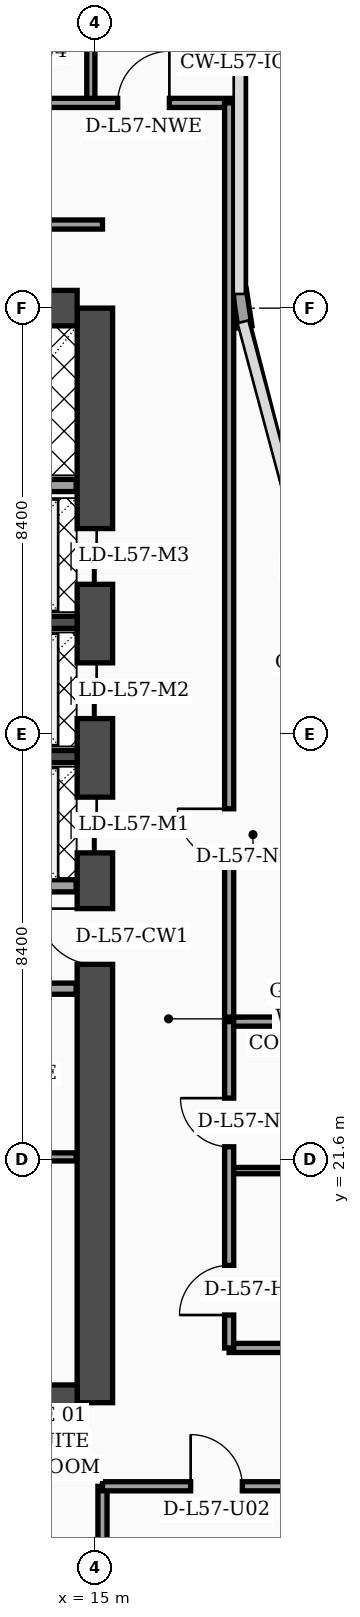
"""IFC4 building model, lengths in metres.
Left out: names, types, materials, properties, quantities, classifications, styles, units other than length and angle.
Written with IfcOpenShell. Run it as: python <this file> out.ifc"""

import sys

from ifc_helpers import new_model, si_unit, direction, frame, frame_2d, origin, place, context, subcontext, project, spatial, rectangle, extrude, element, fill, save


model = new_model("IFC4")
c1 = context("Model", 3, precision=1e-05, world=origin(), true_north=direction((0.0, 1.0)))
c2 = subcontext(c1, "Body", "Model", "MODEL_VIEW")
j1 = project(units=[si_unit("LENGTHUNIT", "METRE"), si_unit("PLANEANGLEUNIT", "RADIAN")], contexts=[c1])
p1 = place(None, origin())
s1 = spatial("IfcSite", under=j1, at=p1, CompositionType="ELEMENT")
p2 = place(p1, origin())
s2 = spatial("IfcBuilding", under=s1, at=p2, CompositionType="ELEMENT")
p3 = place(p2, frame((0.0, 0.0, 230.7)))
s3 = spatial("IfcBuildingStorey", under=s2, at=p3, CompositionType="ELEMENT", Elevation=230.7)
p4 = place(p3, frame((15.0, 16.8, 0.0), z_axis=(0.0, 0.0, 1.0), x_axis=(0.0, 1.0, 0.0)))
e1 = element("IfcWall", 1, at=p4, inside=s3, PredefinedType="SHEAR", context=c2, shape_type="SweptSolid", body=[
    extrude(rectangle(XDim=21.6, YDim=0.7, at=frame_2d((10.8, 0.0))), origin(), (0.0, 0.0, 1.0), 3.52),
])
p5 = place(p4, frame((8.65, 0.0, 0.0)))
e2 = element("IfcOpeningElement", 2, at=p5, cuts=e1, PredefinedType="OPENING", context=c2, shape_type="SweptSolid", body=[
    extrude(rectangle(XDim=1.1, YDim=2.2, at=frame_2d((0.55, 1.1))), frame((0.0, 0.36, 0.0), z_axis=(0.0, -1.0, 0.0), x_axis=(1.0, 0.0, 0.0)), (0.0, 0.0, 1.0), 0.72),
])
p6 = place(p4, frame((10.85, 0.0, 0.0)))
e3 = element("IfcOpeningElement", 3, at=p6, cuts=e1, PredefinedType="OPENING", context=c2, shape_type="SweptSolid", body=[
    extrude(rectangle(XDim=1.1, YDim=2.2, at=frame_2d((0.55, 1.1))), frame((0.0, 0.36, 0.0), z_axis=(0.0, -1.0, 0.0), x_axis=(1.0, 0.0, 0.0)), (0.0, 0.0, 1.0), 0.72),
])
p7 = place(p4, frame((13.5, 0.0, 0.0)))
e4 = element("IfcOpeningElement", 4, at=p7, cuts=e1, PredefinedType="OPENING", context=c2, shape_type="SweptSolid", body=[
    extrude(rectangle(XDim=1.1, YDim=2.2, at=frame_2d((0.55, 1.1))), frame((0.0, 0.36, 0.0), z_axis=(0.0, -1.0, 0.0), x_axis=(1.0, 0.0, 0.0)), (0.0, 0.0, 1.0), 0.72),
])
p8 = place(p4, frame((16.15, 0.0, 0.0)))
e5 = element("IfcOpeningElement", 5, at=p8, cuts=e1, PredefinedType="OPENING", context=c2, shape_type="SweptSolid", body=[
    extrude(rectangle(XDim=1.1, YDim=2.2, at=frame_2d((0.55, 1.1))), frame((0.0, 0.36, 0.0), z_axis=(0.0, -1.0, 0.0), x_axis=(1.0, 0.0, 0.0)), (0.0, 0.0, 1.0), 0.72),
])
for number, where, z_axis, x_axis in (
    (6, (4.55, 38.4, 0.0), (0.0, 0.0, 1.0), (1.0, 0.0, 0.0)),
    (7, (4.55, 16.8, 0.0), (0.0, 0.0, 1.0), (1.0, 0.0, 0.0)),
):
    element("IfcWall", number, at=place(p3, frame(where, z_axis=z_axis, x_axis=x_axis)), inside=s3, PredefinedType="SHEAR", context=c2, shape_type="SweptSolid", body=[
        extrude(rectangle(XDim=10.1, YDim=0.7, at=frame_2d((5.05, 0.0))), origin(), (0.0, 0.0, 1.0), 3.52),
    ])
for number, where, z_axis, x_axis in (
    (8, (12.18, 29.55, 0.0), (0.0, 0.0, 1.0), (1.0, 0.0, 0.0)),
    (9, (12.18, 32.2, 0.0), (0.0, 0.0, 1.0), (1.0, 0.0, 0.0)),
):
    element("IfcWall", number, at=place(p3, frame(where, z_axis=z_axis, x_axis=x_axis)), inside=s3, PredefinedType="SOLIDWALL", context=c2, shape_type="SweptSolid", body=[
        extrude(rectangle(XDim=2.47, YDim=0.24, at=frame_2d((1.235, 0.0))), origin(), (0.0, 0.0, 1.0), 3.52),
    ])
p9 = place(p3, frame((17.962, 38.03, 0.0), z_axis=(0.0, 0.0, 1.0), x_axis=(-0.15141125477, 0.988470855377, 0.0)))
e10 = element("IfcWall", 10, at=p9, inside=s3, PredefinedType="SOLIDWALL", context=c2, shape_type="SweptSolid", body=[
    extrude(rectangle(XDim=0.739, YDim=0.28, at=frame_2d((0.369, 0.0))), origin(), (0.0, 0.0, 1.0), 3.52),
])
p10 = place(p3, frame((9.68, 21.65, 0.0), z_axis=(0.0, 0.0, 1.0), x_axis=(1.0, 0.0, 0.0)))
e11 = element("IfcWall", 11, at=p10, inside=s3, PredefinedType="PARTITIONING", context=c2, shape_type="SweptSolid", body=[
    extrude(rectangle(XDim=4.95, YDim=0.16, at=frame_2d((2.475, 0.0))), origin(), (0.0, 0.0, 1.0), 3.52),
])
p11 = place(p10, frame((1.1, 0.0, 0.0)))
e12 = element("IfcOpeningElement", 12, at=p11, cuts=e11, PredefinedType="OPENING", context=c2, shape_type="SweptSolid", body=[
    extrude(rectangle(XDim=0.98, YDim=2.15, at=frame_2d((0.49, 1.075))), frame((0.0, 0.09, 0.0), z_axis=(0.0, -1.0, 0.0), x_axis=(1.0, 0.0, 0.0)), (0.0, 0.0, 1.0), 0.18),
])
p12 = place(p3, frame((9.68, 24.97, 0.0), z_axis=(0.0, 0.0, 1.0), x_axis=(1.0, 0.0, 0.0)))
e13 = element("IfcWall", 13, at=p12, inside=s3, PredefinedType="SOLIDWALL", context=c2, shape_type="SweptSolid", body=[
    extrude(rectangle(XDim=4.95, YDim=0.22, at=frame_2d((2.475, 0.0))), origin(), (0.0, 0.0, 1.0), 2.92),
])
p13 = place(p12, frame((0.9, 0.0, 0.0)))
e14 = element("IfcOpeningElement", 14, at=p13, cuts=e13, PredefinedType="OPENING", context=c2, shape_type="SweptSolid", body=[
    extrude(rectangle(XDim=0.98, YDim=2.15, at=frame_2d((0.49, 1.075))), frame((0.0, 0.12, 0.0), z_axis=(0.0, -1.0, 0.0), x_axis=(1.0, 0.0, 0.0)), (0.0, 0.0, 1.0), 0.24),
])
p14 = place(p3, frame((12.25, 27.0, 0.0), z_axis=(0.0, 0.0, 1.0), x_axis=(1.0, 0.0, 0.0)))
e15 = element("IfcWall", 15, at=p14, inside=s3, PredefinedType="SOLIDWALL", context=c2, shape_type="SweptSolid", body=[
    extrude(rectangle(XDim=2.38, YDim=0.24, at=frame_2d((1.19, 0.0))), origin(), (0.0, 0.0, 1.0), 3.52),
])
p15 = place(p3, frame((9.66, 34.9, 0.0), z_axis=(0.0, 0.0, 1.0), x_axis=(1.0, 0.0, 0.0)))
e16 = element("IfcWall", 16, at=p15, inside=s3, PredefinedType="SOLIDWALL", context=c2, shape_type="SweptSolid", body=[
    extrude(rectangle(XDim=4.97, YDim=0.24, at=frame_2d((2.485, 0.0))), origin(), (0.0, 0.0, 1.0), 3.52),
])
p16 = place(p3, frame((15.15, 2.44, 0.0), z_axis=(0.0, 0.0, 1.0), x_axis=(0.0, 1.0, 0.0)))
e17 = element("IfcWall", 17, at=p16, inside=s3, PredefinedType="PARTITIONING", context=c2, shape_type="SweptSolid", body=[
    extrude(rectangle(XDim=12.71, YDim=0.18, at=frame_2d((6.355, 0.0))), origin(), (0.0, 0.0, 1.0), 3.07),
])
p17 = place(p3, frame((15.15, 15.15, 0.0), z_axis=(0.0, 0.0, 1.0), x_axis=(1.0, 0.0, 0.0)))
e18 = element("IfcWall", 18, at=p17, inside=s3, PredefinedType="PARTITIONING", context=c2, shape_type="SweptSolid", body=[
    extrude(rectangle(XDim=6.45, YDim=0.18, at=frame_2d((3.225, 0.0))), origin(), (0.0, 0.0, 1.0), 2.57),
])
p18 = place(p17, frame((1.74, 0.0, 0.0)))
e19 = element("IfcOpeningElement", 19, at=p18, cuts=e18, PredefinedType="OPENING", context=c2, shape_type="SweptSolid", body=[
    extrude(rectangle(XDim=1.02, YDim=2.2, at=frame_2d((0.51, 1.1))), frame((0.0, 0.1, 0.0), z_axis=(0.0, -1.0, 0.0), x_axis=(1.0, 0.0, 0.0)), (0.0, 0.0, 1.0), 0.2),
])
p19 = place(p3, frame((14.92, 42.45, 0.0), z_axis=(0.0, 0.0, 1.0), x_axis=(0.0, 1.0, 0.0)))
e20 = element("IfcWall", 20, at=p19, inside=s3, PredefinedType="PARTITIONING", context=c2, shape_type="SweptSolid", body=[
    extrude(rectangle(XDim=5.35, YDim=0.16, at=frame_2d((2.675, 0.0))), origin(), (0.0, 0.0, 1.0), 3.07),
])
p20 = place(p3, frame((0.08, 42.45, 0.0), z_axis=(0.0, 0.0, 1.0), x_axis=(1.0, 0.0, 0.0)))
e21 = element("IfcWall", 21, at=p20, inside=s3, PredefinedType="PARTITIONING", context=c2, shape_type="SweptSolid", body=[
    extrude(rectangle(XDim=17.77, YDim=0.18, at=frame_2d((8.885, 0.0))), origin(), (0.0, 0.0, 1.0), 2.92),
])
p21 = place(p20, frame((0.9, 0.0, 0.0)))
e22 = element("IfcOpeningElement", 22, at=p21, cuts=e21, PredefinedType="OPENING", context=c2, shape_type="SweptSolid", body=[
    extrude(rectangle(XDim=1.02, YDim=2.2, at=frame_2d((0.51, 1.1))), frame((0.0, 0.1, 0.0), z_axis=(0.0, -1.0, 0.0), x_axis=(1.0, 0.0, 0.0)), (0.0, 0.0, 1.0), 0.2),
])
p22 = place(p20, frame((4.04, 0.0, 0.0)))
e23 = element("IfcOpeningElement", 23, at=p22, cuts=e21, PredefinedType="OPENING", context=c2, shape_type="SweptSolid", body=[
    extrude(rectangle(XDim=1.02, YDim=2.2, at=frame_2d((0.51, 1.1))), frame((0.0, 0.1, 0.0), z_axis=(0.0, -1.0, 0.0), x_axis=(1.0, 0.0, 0.0)), (0.0, 0.0, 1.0), 0.2),
])
p23 = place(p20, frame((9.92, 0.0, 0.0)))
e24 = element("IfcOpeningElement", 24, at=p23, cuts=e21, PredefinedType="OPENING", context=c2, shape_type="SweptSolid", body=[
    extrude(rectangle(XDim=1.02, YDim=2.2, at=frame_2d((0.51, 1.1))), frame((0.0, 0.1, 0.0), z_axis=(0.0, -1.0, 0.0), x_axis=(1.0, 0.0, 0.0)), (0.0, 0.0, 1.0), 0.2),
])
p24 = place(p20, frame((15.37, 0.0, 0.0)))
e25 = element("IfcOpeningElement", 25, at=p24, cuts=e21, PredefinedType="OPENING", context=c2, shape_type="SweptSolid", body=[
    extrude(rectangle(XDim=1.02, YDim=2.2, at=frame_2d((0.51, 1.1))), frame((0.0, 0.1, 0.0), z_axis=(0.0, -1.0, 0.0), x_axis=(1.0, 0.0, 0.0)), (0.0, 0.0, 1.0), 0.2),
])
p25 = place(p3, frame((17.65, 24.3, 0.0), z_axis=(0.0, 0.0, 1.0), x_axis=(0.0, 1.0, 0.0)))
e26 = element("IfcWall", 26, at=p25, inside=s3, PredefinedType="PARTITIONING", context=c2, shape_type="SweptSolid", body=[
    extrude(rectangle(XDim=18.15, YDim=0.18, at=frame_2d((9.075, 0.0))), origin(), (0.0, 0.0, 1.0), 2.92),
])
p26 = place(p25, frame((3.2, 0.0, 0.0)))
e27 = element("IfcOpeningElement", 27, at=p26, cuts=e26, PredefinedType="OPENING", context=c2, shape_type="SweptSolid", body=[
    extrude(rectangle(XDim=1.02, YDim=2.2, at=frame_2d((0.51, 1.1))), frame((0.0, 0.1, 0.0), z_axis=(0.0, -1.0, 0.0), x_axis=(1.0, 0.0, 0.0)), (0.0, 0.0, 1.0), 0.2),
])
p27 = place(p3, frame((3.83, 40.05, 0.0), z_axis=(0.0, 0.0, 1.0), x_axis=(1.0, 0.0, 0.0)))
e28 = element("IfcWall", 28, at=p27, inside=s3, PredefinedType="PARTITIONING", context=c2, shape_type="SweptSolid", body=[
    extrude(rectangle(XDim=11.32, YDim=0.18, at=frame_2d((5.66, 0.0))), origin(), (0.0, 0.0, 1.0), 2.92),
])
p28 = place(p3, frame((17.65, 17.88, 0.0), z_axis=(0.0, 0.0, 1.0), x_axis=(1.0, 0.0, 0.0)))
e29 = element("IfcWall", 29, at=p28, inside=s3, PredefinedType="PARTITIONING", context=c2, shape_type="SweptSolid", body=[
    extrude(rectangle(XDim=3.9, YDim=0.18, at=frame_2d((1.95, 0.0))), origin(), (0.0, 0.0, 1.0), 3.52),
])
p29 = place(p3, frame((17.65, 21.38, 0.0), z_axis=(0.0, 0.0, 1.0), x_axis=(1.0, 0.0, 0.0)))
e30 = element("IfcWall", 30, at=p29, inside=s3, PredefinedType="PARTITIONING", context=c2, shape_type="SweptSolid", body=[
    extrude(rectangle(XDim=3.9, YDim=0.125, at=frame_2d((1.95, 0.0))), origin(), (0.0, 0.0, 1.0), 3.52),
])
p30 = place(p3, frame((17.65, 24.32, 0.0), z_axis=(0.0, 0.0, 1.0), x_axis=(1.0, 0.0, 0.0)))
e31 = element("IfcWall", 31, at=p30, inside=s3, PredefinedType="PARTITIONING", context=c2, shape_type="SweptSolid", body=[
    extrude(rectangle(XDim=3.95, YDim=0.18, at=frame_2d((1.975, 0.0))), origin(), (0.0, 0.0, 1.0), 3.52),
])
p31 = place(p3, frame((17.65, 17.88, 0.0), z_axis=(0.0, 0.0, 1.0), x_axis=(0.0, 1.0, 0.0)))
e32 = element("IfcWall", 32, at=p31, inside=s3, PredefinedType="PARTITIONING", context=c2, shape_type="SweptSolid", body=[
    extrude(rectangle(XDim=6.44, YDim=0.18, at=frame_2d((3.22, 0.0))), origin(), (0.0, 0.0, 1.0), 3.52),
])
p32 = place(p31, frame((0.65, 0.0, 0.0)))
e33 = element("IfcOpeningElement", 33, at=p32, cuts=e32, PredefinedType="OPENING", context=c2, shape_type="SweptSolid", body=[
    extrude(rectangle(XDim=0.98, YDim=2.15, at=frame_2d((0.49, 1.075))), frame((0.0, 0.1, 0.0), z_axis=(0.0, -1.0, 0.0), x_axis=(1.0, 0.0, 0.0)), (0.0, 0.0, 1.0), 0.2),
])
p33 = place(p31, frame((3.97, 0.0, 0.0)))
e34 = element("IfcOpeningElement", 34, at=p33, cuts=e32, PredefinedType="OPENING", context=c2, shape_type="SweptSolid", body=[
    extrude(rectangle(XDim=0.96, YDim=2.2, at=frame_2d((0.48, 1.1))), frame((0.0, 0.1, 0.0), z_axis=(0.0, -1.0, 0.0), x_axis=(1.0, 0.0, 0.0)), (0.0, 0.0, 1.0), 0.2),
])
p34 = place(p18, origin())
e35 = element("IfcDoor", 35, at=p34, inside=s3, OperationType="SINGLE_SWING_LEFT", PredefinedType="DOOR", context=c2, shape_type="SweptSolid", body=[
    extrude(rectangle(XDim=1.02, YDim=2.2, at=frame_2d((0.51, 1.1))), frame((0.0, 0.025, 0.0), z_axis=(0.0, -1.0, 0.0), x_axis=(1.0, 0.0, 0.0)), (0.0, 0.0, 1.0), 0.05),
])
fill(e19, e35)
p35 = place(p24, origin())
e36 = element("IfcDoor", 36, at=p35, inside=s3, OperationType="SINGLE_SWING_RIGHT", PredefinedType="DOOR", context=c2, shape_type="SweptSolid", body=[
    extrude(rectangle(XDim=1.02, YDim=2.2, at=frame_2d((0.51, 1.1))), frame((0.0, 0.025, 0.0), z_axis=(0.0, -1.0, 0.0), x_axis=(1.0, 0.0, 0.0)), (0.0, 0.0, 1.0), 0.05),
])
fill(e25, e36)
p36 = place(p26, origin())
e37 = element("IfcDoor", 37, at=p36, inside=s3, OperationType="SINGLE_SWING_RIGHT", PredefinedType="DOOR", context=c2, shape_type="SweptSolid", body=[
    extrude(rectangle(XDim=1.02, YDim=2.2, at=frame_2d((0.51, 1.1))), frame((0.0, 0.025, 0.0), z_axis=(0.0, -1.0, 0.0), x_axis=(1.0, 0.0, 0.0)), (0.0, 0.0, 1.0), 0.05),
])
fill(e27, e37)
p37 = place(p32, origin())
e38 = element("IfcDoor", 38, at=p37, inside=s3, OperationType="SINGLE_SWING_LEFT", PredefinedType="DOOR", context=c2, shape_type="SweptSolid", body=[
    extrude(rectangle(XDim=0.98, YDim=2.15, at=frame_2d((0.49, 1.075))), frame((0.0, 0.025, 0.0), z_axis=(0.0, -1.0, 0.0), x_axis=(1.0, 0.0, 0.0)), (0.0, 0.0, 1.0), 0.05),
])
fill(e33, e38)
p38 = place(p33, origin())
e39 = element("IfcDoor", 39, at=p38, inside=s3, OperationType="SINGLE_SWING_RIGHT", PredefinedType="DOOR", context=c2, shape_type="SweptSolid", body=[
    extrude(rectangle(XDim=0.96, YDim=2.2, at=frame_2d((0.48, 1.1))), frame((0.0, 0.025, 0.0), z_axis=(0.0, -1.0, 0.0), x_axis=(1.0, 0.0, 0.0)), (0.0, 0.0, 1.0), 0.05),
])
fill(e34, e39)
p39 = place(p5, origin())
e40 = element("IfcDoor", 40, at=p39, inside=s3, OperationType="SINGLE_SWING_RIGHT", PredefinedType="DOOR", context=c2, shape_type="SweptSolid", body=[
    extrude(rectangle(XDim=1.1, YDim=2.2, at=frame_2d((0.55, 1.1))), frame((0.0, 0.025, 0.0), z_axis=(0.0, -1.0, 0.0), x_axis=(1.0, 0.0, 0.0)), (0.0, 0.0, 1.0), 0.05),
])
fill(e2, e40)
p40 = place(p6, origin())
e41 = element("IfcDoor", 41, at=p40, inside=s3, OperationType="DOUBLE_DOOR_SLIDING", PredefinedType="DOOR", context=c2, shape_type="SweptSolid", body=[
    extrude(rectangle(XDim=1.1, YDim=2.2, at=frame_2d((0.55, 1.1))), frame((0.0, 0.025, 0.0), z_axis=(0.0, -1.0, 0.0), x_axis=(1.0, 0.0, 0.0)), (0.0, 0.0, 1.0), 0.05),
])
fill(e3, e41)
p41 = place(p7, origin())
e42 = element("IfcDoor", 42, at=p41, inside=s3, OperationType="DOUBLE_DOOR_SLIDING", PredefinedType="DOOR", context=c2, shape_type="SweptSolid", body=[
    extrude(rectangle(XDim=1.1, YDim=2.2, at=frame_2d((0.55, 1.1))), frame((0.0, 0.025, 0.0), z_axis=(0.0, -1.0, 0.0), x_axis=(1.0, 0.0, 0.0)), (0.0, 0.0, 1.0), 0.05),
])
fill(e4, e42)
p42 = place(p8, origin())
e43 = element("IfcDoor", 43, at=p42, inside=s3, OperationType="DOUBLE_DOOR_SLIDING", PredefinedType="DOOR", context=c2, shape_type="SweptSolid", body=[
    extrude(rectangle(XDim=1.1, YDim=2.2, at=frame_2d((0.55, 1.1))), frame((0.0, 0.025, 0.0), z_axis=(0.0, -1.0, 0.0), x_axis=(1.0, 0.0, 0.0)), (0.0, 0.0, 1.0), 0.05),
])
fill(e5, e43)
save(model, sys.argv[1])
